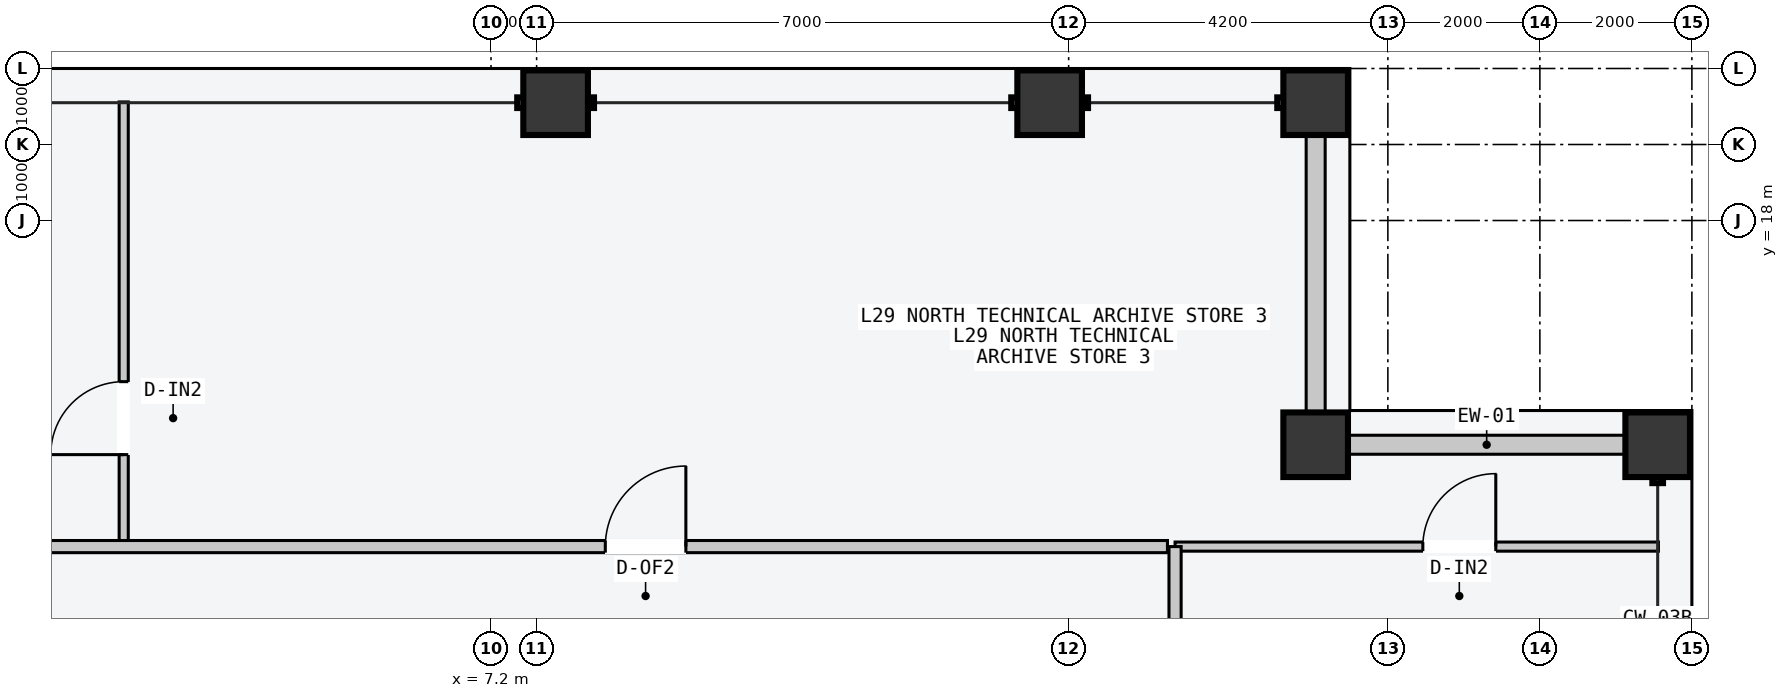
"""IFC4 building model, lengths in metres.
Left out: names, types, materials, properties, quantities, classifications, styles, units other than length and angle.
Written with IfcOpenShell. Run it as: python <this file> out.ifc"""

import sys

from ifc_helpers import new_model, si_unit, direction, frame, frame_2d, origin, origin_2d, place, context, subcontext, project, spatial, rectangle, hollow_rectangle, extrude, element, fill, save


model = new_model("IFC4")
c1 = context("Model", 3, precision=1e-05, world=origin(), true_north=direction((0.0, 1.0)))
c2 = subcontext(c1, "Body", "Model", "MODEL_VIEW")
j1 = project(units=[si_unit("LENGTHUNIT", "METRE"), si_unit("PLANEANGLEUNIT", "RADIAN")], contexts=[c1])
p1 = place(None, origin())
s1 = spatial("IfcSite", under=j1, at=p1, CompositionType="ELEMENT")
p2 = place(p1, origin())
s2 = spatial("IfcBuilding", under=s1, at=p2, CompositionType="ELEMENT")
p3 = place(p2, frame((0.0, 0.0, 113.4)))
s3 = spatial("IfcBuildingStorey", under=s2, at=p3, CompositionType="ELEMENT", Elevation=113.4)
for number, where, z_axis, x_axis in (
    (1, (8.05, 19.55, 0.0), (0.0, 0.0, 1.0), (1.0, 0.0, 0.0)),
    (2, (14.55, 19.55, 0.0), (0.0, 0.0, 1.0), (1.0, 0.0, 0.0)),
    (3, (18.05, 19.55, 0.0), (0.0, 0.0, 1.0), (1.0, 0.0, 0.0)),
    (4, (22.55, 15.05, 0.0), (0.0, 0.0, 1.0), (0.0, 1.0, 0.0)),
    (5, (18.05, 15.05, 0.0), (0.0, 0.0, 1.0), (1.0, 0.0, 0.0)),
):
    element("IfcColumn", number, at=place(p3, frame(where, z_axis=z_axis, x_axis=x_axis)), inside=s3, PredefinedType="COLUMN", context=c2, shape_type="SweptSolid", body=[
        extrude(hollow_rectangle(XDim=0.85, YDim=0.85, WallThickness=0.04, at=origin_2d()), origin(), (0.0, 0.0, 1.0), 3.6),
    ])
for number, where, z_axis, x_axis in (
    (6, (18.485, 15.05, 0.0), (0.0, 0.0, 1.0), (1.0, 0.0, 0.0)),
    (7, (18.05, 15.485, 0.0), (0.0, 0.0, 1.0), (0.0, 1.0, 0.0)),
):
    element("IfcWall", number, at=place(p3, frame(where, z_axis=z_axis, x_axis=x_axis)), inside=s3, PredefinedType="STANDARD", context=c2, shape_type="SweptSolid", body=[
        extrude(rectangle(XDim=3.63, YDim=0.25, at=frame_2d((1.815, 0.0))), origin(), (0.0, 0.0, 1.0), 2.75),
    ])
p4 = place(p3, frame((2.367, 13.77, 0.0), z_axis=(0.0, 0.0, 1.0), x_axis=(0.0, 1.0, 0.0)))
e8 = element("IfcWall", 8, at=p4, inside=s3, PredefinedType="PARTITIONING", context=c2, shape_type="SweptSolid", body=[
    extrude(rectangle(XDim=5.79, YDim=0.12, at=frame_2d((2.895, 0.0))), origin(), (0.0, 0.0, 1.0), 3.4),
])
p5 = place(p4, frame((1.15, 0.0, 0.0)))
e9 = element("IfcOpeningElement", 9, at=p5, cuts=e8, PredefinedType="OPENING", context=c2, shape_type="SweptSolid", body=[
    extrude(rectangle(XDim=0.96, YDim=2.18, at=frame_2d((0.48, 1.09))), frame((0.0, 0.07, 0.0), z_axis=(0.0, -1.0, 0.0), x_axis=(1.0, 0.0, 0.0)), (0.0, 0.0, 1.0), 0.14),
])
p6 = place(p3, frame((-16.1, 13.71, 0.0), z_axis=(0.0, 0.0, 1.0), x_axis=(1.0, 0.0, 0.0)))
e10 = element("IfcWall", 10, at=p6, inside=s3, PredefinedType="PARTITIONING", context=c2, shape_type="SweptSolid", body=[
    extrude(rectangle(XDim=32.2, YDim=0.16, at=frame_2d((16.1, 0.0))), origin(), (0.0, 0.0, 1.0), 3.4),
])
p7 = place(p6, frame((3.004, 0.0, 0.0)))
e11 = element("IfcOpeningElement", 11, at=p7, cuts=e10, PredefinedType="OPENING", context=c2, shape_type="SweptSolid", body=[
    extrude(rectangle(XDim=0.96, YDim=2.18, at=frame_2d((0.48, 1.09))), frame((0.0, 0.09, 0.0), z_axis=(0.0, -1.0, 0.0), x_axis=(1.0, 0.0, 0.0)), (0.0, 0.0, 1.0), 0.18),
])
p8 = place(p6, frame((12.208, 0.0, 0.0)))
e12 = element("IfcOpeningElement", 12, at=p8, cuts=e10, PredefinedType="OPENING", context=c2, shape_type="SweptSolid", body=[
    extrude(rectangle(XDim=1.02, YDim=2.2, at=frame_2d((0.51, 1.1))), frame((0.0, 0.09, 0.0), z_axis=(0.0, -1.0, 0.0), x_axis=(1.0, 0.0, 0.0)), (0.0, 0.0, 1.0), 0.18),
])
p9 = place(p6, frame((24.804, 0.0, 0.0)))
e13 = element("IfcOpeningElement", 13, at=p9, cuts=e10, PredefinedType="OPENING", context=c2, shape_type="SweptSolid", body=[
    extrude(rectangle(XDim=1.06, YDim=2.2, at=frame_2d((0.53, 1.1))), frame((0.0, 0.09, 0.0), z_axis=(0.0, -1.0, 0.0), x_axis=(1.0, 0.0, 0.0)), (0.0, 0.0, 1.0), 0.18),
])
p10 = place(p3, frame((16.2, 13.71, 0.0), z_axis=(0.0, 0.0, 1.0), x_axis=(1.0, 0.0, 0.0)))
e14 = element("IfcWall", 14, at=p10, inside=s3, PredefinedType="PARTITIONING", context=c2, shape_type="SweptSolid", body=[
    extrude(rectangle(XDim=6.36, YDim=0.12, at=frame_2d((3.18, 0.0))), origin(), (0.0, 0.0, 1.0), 3.4),
])
p11 = place(p10, frame((3.26, 0.0, 0.0)))
e15 = element("IfcOpeningElement", 15, at=p11, cuts=e14, PredefinedType="OPENING", context=c2, shape_type="SweptSolid", body=[
    extrude(rectangle(XDim=0.96, YDim=2.18, at=frame_2d((0.48, 1.09))), frame((0.0, 0.07, 0.0), z_axis=(0.0, -1.0, 0.0), x_axis=(1.0, 0.0, 0.0)), (0.0, 0.0, 1.0), 0.14),
])
p12 = place(p3, frame((16.2, 11.76, 0.0), z_axis=(0.0, 0.0, 1.0), x_axis=(0.0, 1.0, 0.0)))
e16 = element("IfcWall", 16, at=p12, inside=s3, PredefinedType="PARTITIONING", context=c2, shape_type="SweptSolid", body=[
    extrude(rectangle(XDim=1.95, YDim=0.16, at=frame_2d((0.975, 0.0))), origin(), (0.0, 0.0, 1.0), 3.4),
])
p13 = place(p5, origin())
e17 = element("IfcDoor", 17, at=p13, inside=s3, OperationType="SINGLE_SWING_LEFT", PredefinedType="DOOR", context=c2, shape_type="SweptSolid", body=[
    extrude(rectangle(XDim=0.96, YDim=2.18, at=frame_2d((0.48, 1.09))), frame((0.0, 0.025, 0.0), z_axis=(0.0, -1.0, 0.0), x_axis=(1.0, 0.0, 0.0)), (0.0, 0.0, 1.0), 0.05),
])
fill(e9, e17)
p14 = place(p9, origin())
e18 = element("IfcDoor", 18, at=p14, inside=s3, OperationType="SINGLE_SWING_RIGHT", PredefinedType="DOOR", context=c2, shape_type="SweptSolid", body=[
    extrude(rectangle(XDim=1.06, YDim=2.2, at=frame_2d((0.53, 1.1))), frame((0.0, 0.025, 0.0), z_axis=(0.0, -1.0, 0.0), x_axis=(1.0, 0.0, 0.0)), (0.0, 0.0, 1.0), 0.05),
])
fill(e13, e18)
p15 = place(p11, origin())
e19 = element("IfcDoor", 19, at=p15, inside=s3, OperationType="SINGLE_SWING_RIGHT", PredefinedType="DOOR", context=c2, shape_type="SweptSolid", body=[
    extrude(rectangle(XDim=0.96, YDim=2.18, at=frame_2d((0.48, 1.09))), frame((0.0, 0.025, 0.0), z_axis=(0.0, -1.0, 0.0), x_axis=(1.0, 0.0, 0.0)), (0.0, 0.0, 1.0), 0.05),
])
fill(e15, e19)
save(model, sys.argv[1])
